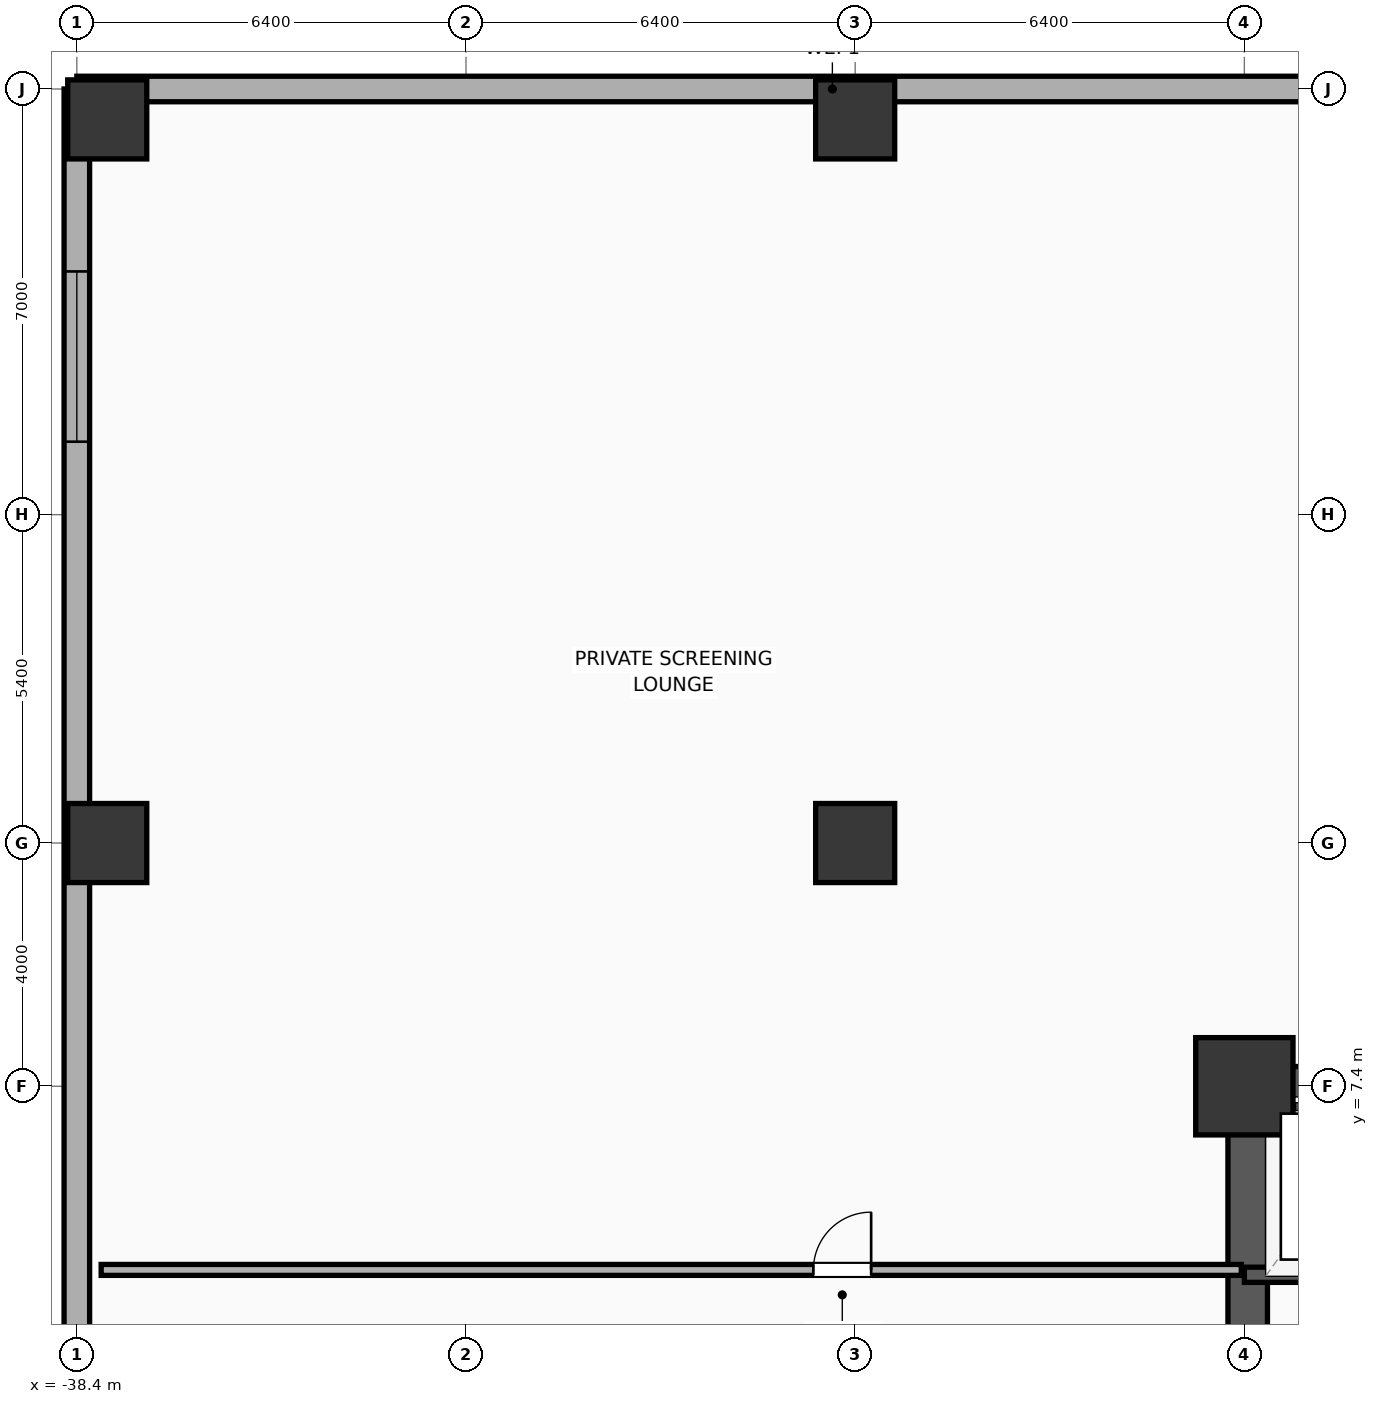
"""IFC4 building model, lengths in metres.
Left out: names, types, materials, properties, quantities, classifications, styles, units other than length and angle.
Written with IfcOpenShell. Run it as: python <this file> out.ifc"""

import sys

from ifc_helpers import new_model, si_unit, direction, frame, frame_2d, origin, origin_2d, place, context, subcontext, project, spatial, rectangle, extrude, element, fill, save


model = new_model("IFC4")
c1 = context("Model", 3, precision=1e-05, world=origin(), true_north=direction((0.0, 1.0)))
c2 = subcontext(c1, "Body", "Model", "MODEL_VIEW")
j1 = project(units=[si_unit("LENGTHUNIT", "METRE"), si_unit("PLANEANGLEUNIT", "RADIAN")], contexts=[c1])
p1 = place(None, origin())
s1 = spatial("IfcSite", under=j1, at=p1, CompositionType="ELEMENT")
p2 = place(p1, origin())
s2 = spatial("IfcBuilding", under=s1, at=p2, CompositionType="ELEMENT")
p3 = place(p2, frame((0.0, 0.0, 20.8)))
s3 = spatial("IfcBuildingStorey", under=s2, at=p3, CompositionType="ELEMENT", Elevation=20.8)
p4 = place(p3, frame((-19.2, 7.4, 0.0), z_axis=(0.0, 0.0, 1.0), x_axis=(1.0, 0.0, 0.0)))
e1 = element("IfcColumn", 1, at=p4, inside=s3, PredefinedType="COLUMN", context=c2, shape_type="SweptSolid", body=[
    extrude(rectangle(XDim=1.6, YDim=1.6, at=origin_2d()), origin(), (0.0, 0.0, 1.0), 5.2),
])
p5 = place(p3, frame((-19.525, 7.4, 0.0), z_axis=(0.0, 0.0, 1.0), x_axis=(1.0, 0.0, 0.0)))
e2 = element("IfcWall", 2, at=p5, inside=s3, PredefinedType="SHEAR", context=c2, shape_type="SweptSolid", body=[
    extrude(rectangle(XDim=7.45, YDim=0.65, at=frame_2d((3.725, 0.0))), origin(), (0.0, 0.0, 1.0), 4.95),
])
p6 = place(p3, frame((-19.145, -7.4, 0.0), z_axis=(0.0, 0.0, 1.0), x_axis=(0.0, 1.0, 0.0)))
e3 = element("IfcWall", 3, at=p6, inside=s3, PredefinedType="SHEAR", context=c2, shape_type="SweptSolid", body=[
    extrude(rectangle(XDim=14.8, YDim=0.65, at=frame_2d((7.4, 0.0))), origin(), (0.0, 0.0, 1.0), 4.95),
])
for number, where, z_axis, x_axis in (
    (4, (-37.9, 11.4, 0.0), (0.0, 0.0, 1.0), (1.0, 0.0, 0.0)),
    (5, (-37.9, 23.3, 0.0), (0.0, 0.0, 1.0), (1.0, 0.0, 0.0)),
    (6, (-25.6, 11.4, 0.0), (0.0, 0.0, 1.0), (1.0, 0.0, 0.0)),
    (7, (-25.6, 23.3, 0.0), (0.0, 0.0, 1.0), (1.0, 0.0, 0.0)),
):
    element("IfcColumn", number, at=place(p3, frame(where, z_axis=z_axis, x_axis=x_axis)), inside=s3, PredefinedType="COLUMN", context=c2, shape_type="SweptSolid", body=[
        extrude(rectangle(XDim=1.3, YDim=1.3, at=origin_2d()), origin(), (0.0, 0.0, 1.0), 5.2),
    ])
p7 = place(p3, frame((-38.4, 23.8, 0.0), z_axis=(0.0, 0.0, 1.0), x_axis=(1.0, 0.0, 0.0)))
e8 = element("IfcWall", 8, at=p7, inside=s3, PredefinedType="ELEMENTEDWALL", context=c2, shape_type="SweptSolid", body=[
    extrude(rectangle(XDim=24.85, YDim=0.42, at=frame_2d((12.425, 0.0))), origin(), (0.0, 0.0, 1.0), 3.84),
])
p8 = place(p3, frame((-38.4, 23.8, 0.0), z_axis=(0.0, 0.0, 1.0), x_axis=(0.0, -1.0, 0.0)))
e9 = element("IfcWall", 9, at=p8, inside=s3, PredefinedType="ELEMENTEDWALL", context=c2, shape_type="SweptSolid", body=[
    extrude(rectangle(XDim=47.6, YDim=0.42, at=frame_2d((23.8, 0.0))), origin(), (0.0, 0.0, 1.0), 4.95),
])
p9 = place(p8, frame((3.0, 0.0, 0.65)))
e10 = element("IfcOpeningElement", 10, at=p9, cuts=e9, PredefinedType="OPENING", context=c2, shape_type="SweptSolid", body=[
    extrude(rectangle(XDim=2.8, YDim=2.6, at=frame_2d((1.4, 1.3))), frame((0.0, 0.22, 0.0), z_axis=(0.0, -1.0, 0.0), x_axis=(1.0, 0.0, 0.0)), (0.0, 0.0, 1.0), 0.44),
])
p10 = place(p8, frame((31.0, 0.0, 0.65)))
e11 = element("IfcOpeningElement", 11, at=p10, cuts=e9, PredefinedType="OPENING", context=c2, shape_type="SweptSolid", body=[
    extrude(rectangle(XDim=2.8, YDim=2.6, at=frame_2d((1.4, 1.3))), frame((0.0, 0.22, 0.0), z_axis=(0.0, -1.0, 0.0), x_axis=(1.0, 0.0, 0.0)), (0.0, 0.0, 1.0), 0.44),
])
p11 = place(p8, frame((38.0, 0.0, 0.65)))
e12 = element("IfcOpeningElement", 12, at=p11, cuts=e9, PredefinedType="OPENING", context=c2, shape_type="SweptSolid", body=[
    extrude(rectangle(XDim=2.8, YDim=2.6, at=frame_2d((1.4, 1.3))), frame((0.0, 0.22, 0.0), z_axis=(0.0, -1.0, 0.0), x_axis=(1.0, 0.0, 0.0)), (0.0, 0.0, 1.0), 0.44),
])
p12 = place(p3, frame((-19.2, 4.3, 0.0), z_axis=(0.0, 0.0, 1.0), x_axis=(1.0, 0.0, 0.0)))
e13 = element("IfcWall", 13, at=p12, inside=s3, PredefinedType="SOLIDWALL", context=c2, shape_type="SweptSolid", body=[
    extrude(rectangle(XDim=2.6, YDim=0.25, at=frame_2d((1.3, 0.0))), origin(), (0.0, 0.0, 1.0), 4.95),
])
p13 = place(p3, frame((-38.0, 4.38, 0.0), z_axis=(0.0, 0.0, 1.0), x_axis=(1.0, 0.0, 0.0)))
e14 = element("IfcWall", 14, at=p13, inside=s3, PredefinedType="PARTITIONING", context=c2, shape_type="SweptSolid", body=[
    extrude(rectangle(XDim=18.75, YDim=0.18, at=frame_2d((9.375, 0.0))), origin(), (0.0, 0.0, 1.0), 4.95),
])
p14 = place(p13, frame((11.712, 0.0, 0.0)))
e15 = element("IfcOpeningElement", 15, at=p14, cuts=e14, PredefinedType="OPENING", context=c2, shape_type="SweptSolid", body=[
    extrude(rectangle(XDim=0.95, YDim=2.05, at=frame_2d((0.475, 1.025))), frame((0.0, 0.1, 0.0), z_axis=(0.0, -1.0, 0.0), x_axis=(1.0, 0.0, 0.0)), (0.0, 0.0, 1.0), 0.2),
])
p15 = place(p9, origin())
e16 = element("IfcWindow", 16, at=p15, inside=s3, PartitioningType="SINGLE_PANEL", PredefinedType="WINDOW", context=c2, shape_type="SweptSolid", body=[
    extrude(rectangle(XDim=2.8, YDim=2.6, at=frame_2d((1.4, 1.3))), frame((0.0, 0.03, 0.0), z_axis=(0.0, -1.0, 0.0), x_axis=(1.0, 0.0, 0.0)), (0.0, 0.0, 1.0), 0.06),
])
fill(e10, e16)
p16 = place(p14, origin())
e17 = element("IfcDoor", 17, at=p16, inside=s3, OperationType="SINGLE_SWING_RIGHT", PredefinedType="DOOR", context=c2, shape_type="SweptSolid", body=[
    extrude(rectangle(XDim=0.95, YDim=2.05, at=frame_2d((0.475, 1.025))), frame((0.0, 0.025, 0.0), z_axis=(0.0, -1.0, 0.0), x_axis=(1.0, 0.0, 0.0)), (0.0, 0.0, 1.0), 0.05),
])
fill(e15, e17)
save(model, sys.argv[1])
